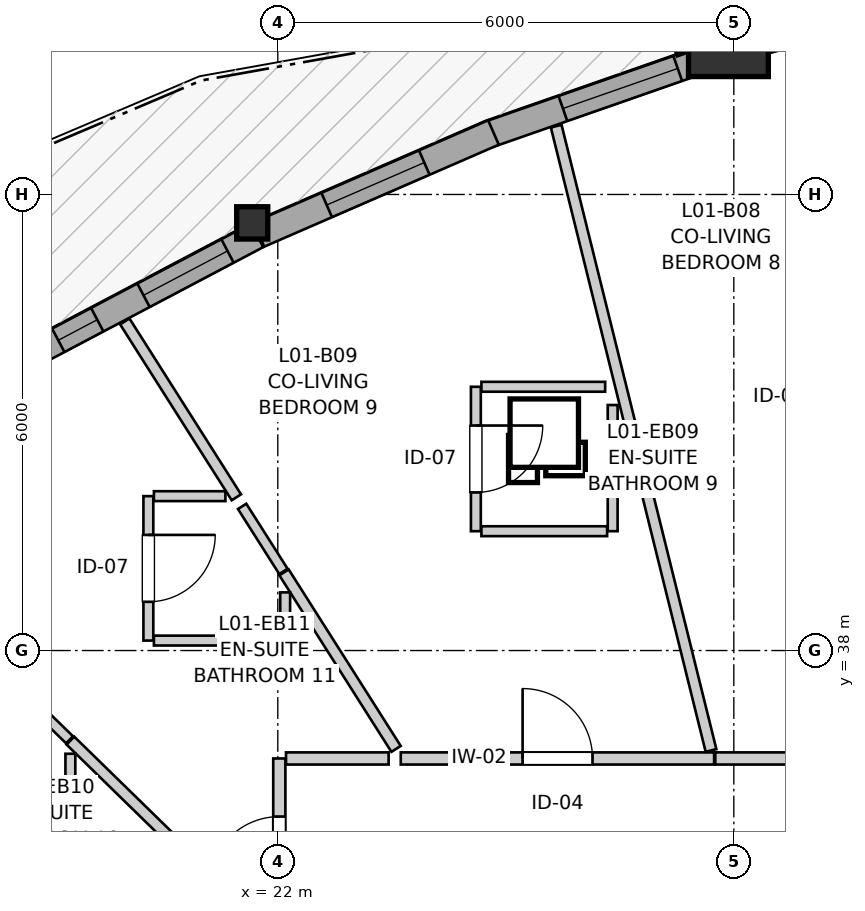
"""IFC4 building model, lengths in metres.
Left out: names, types, materials, properties, quantities, classifications, styles, units other than length and angle.
Written with IfcOpenShell. Run it as: python <this file> out.ifc"""

import sys

from ifc_helpers import new_model, si_unit, direction, frame, frame_2d, origin, origin_2d, place, context, subcontext, project, spatial, rectangle, i_section, extrude, source, transform, mapped, element, fill, save


model = new_model("IFC4")
c1 = context("Model", 3, precision=1e-05, world=origin(), true_north=direction((0.0, 1.0)))
c2 = subcontext(c1, "Body", "Model", "MODEL_VIEW")
j1 = project(units=[si_unit("LENGTHUNIT", "METRE"), si_unit("PLANEANGLEUNIT", "RADIAN")], contexts=[c1])
p1 = place(None, origin())
s1 = spatial("IfcSite", under=j1, at=p1, CompositionType="ELEMENT")
p2 = place(p1, origin())
s2 = spatial("IfcBuilding", under=s1, at=p2, CompositionType="ELEMENT")
p3 = place(p2, frame((0.0, 0.0, 7.8)))
s3 = spatial("IfcBuildingStorey", under=s2, at=p3, CompositionType="ELEMENT", Elevation=7.8)
m1 = source(origin(), c2, "Body", "SweptSolid", [
    extrude(rectangle(XDim=1.05, YDim=1.05, at=origin_2d()), origin(), (0.0, 0.0, 1.0), 2.94),
])
p4 = place(p3, frame((27.929, 46.076, 0.0), z_axis=(0.0, 0.0, 1.0), x_axis=(1.0, 0.0, 0.0)))
e1 = element("IfcColumn", 1, at=p4, inside=s3, PredefinedType="COLUMN", context=c2, shape_type="MappedRepresentation", body=[
    mapped(m1, transform((0.0, 0.0, 0.0), x_axis=(1.0, 0.0, 0.0), y_axis=(0.0, 1.0, 0.0), z_axis=(0.0, 0.0, 1.0), scale=1.0)),
])
m2 = source(origin(), c2, "Body", "SweptSolid", [
    extrude(i_section(OverallWidth=0.409, OverallDepth=0.425, WebThickness=0.03, FlangeThickness=0.048, FilletRadius=0.015, at=origin_2d()), origin(), (0.0, 0.0, 1.0), 2.94),
])
p5 = place(p3, frame((21.664, 43.626, 0.0), z_axis=(0.0, 0.0, 1.0), x_axis=(1.0, 0.0, 0.0)))
e2 = element("IfcColumn", 2, at=p5, inside=s3, PredefinedType="PILASTER", context=c2, shape_type="MappedRepresentation", body=[
    mapped(m2, transform((0.0, 0.0, 0.0), x_axis=(1.0, 0.0, 0.0), y_axis=(0.0, 1.0, 0.0), z_axis=(0.0, 0.0, 1.0), scale=1.0)),
])
p6 = place(p3, frame((31.333, 46.814, 0.0), z_axis=(0.0, 0.0, 1.0), x_axis=(-0.965456905924, -0.260562780926, 0.0)))
e3 = element("IfcWall", 3, at=p6, inside=s3, PredefinedType="SOLIDWALL", context=c2, shape_type="SweptSolid", body=[
    extrude(rectangle(XDim=3.179, YDim=0.35, at=frame_2d((1.59, 0.0))), origin(), (0.0, 0.0, 1.0), 2.42),
])
p7 = place(p6, frame((1.09, 0.0, 0.0)))
e4 = element("IfcOpeningElement", 4, at=p7, cuts=e3, PredefinedType="OPENING", context=c2, shape_type="SweptSolid", body=[
    extrude(rectangle(XDim=1.0, YDim=2.1, at=frame_2d((0.5, 1.05))), frame((0.0, 0.185, 0.0), z_axis=(0.0, -1.0, 0.0), x_axis=(1.0, 0.0, 0.0)), (0.0, 0.0, 1.0), 0.37),
])
p8 = place(p3, frame((27.703, 45.812, 0.0), z_axis=(0.0, 0.0, 1.0), x_axis=(-0.944149283204, -0.329518028377, 0.0)))
e5 = element("IfcWall", 5, at=p8, inside=s3, PredefinedType="SOLIDWALL", context=c2, shape_type="SweptSolid", body=[
    extrude(rectangle(XDim=3.123, YDim=0.35, at=frame_2d((1.562, 0.0))), origin(), (0.0, 0.0, 1.0), 2.42),
])
p9 = place(p8, frame((0.468, 0.0, 0.82)))
e6 = element("IfcOpeningElement", 6, at=p9, cuts=e5, PredefinedType="OPENING", context=c2, shape_type="SweptSolid", body=[
    extrude(rectangle(XDim=1.6, YDim=1.35, at=frame_2d((0.8, 0.675))), frame((0.0, 0.185, 0.0), z_axis=(0.0, -1.0, 0.0), x_axis=(1.0, 0.0, 0.0)), (0.0, 0.0, 1.0), 0.37),
])
p10 = place(p3, frame((24.838, 44.815, 0.0), z_axis=(0.0, 0.0, 1.0), x_axis=(-0.917087357706, -0.398686315712, 0.0)))
e7 = element("IfcWall", 7, at=p10, inside=s3, PredefinedType="SOLIDWALL", context=c2, shape_type="SweptSolid", body=[
    extrude(rectangle(XDim=3.365, YDim=0.35, at=frame_2d((1.683, 0.0))), origin(), (0.0, 0.0, 1.0), 2.42),
])
p11 = place(p10, frame((0.992, 0.0, 0.82)))
e8 = element("IfcOpeningElement", 8, at=p11, cuts=e7, PredefinedType="OPENING", context=c2, shape_type="SweptSolid", body=[
    extrude(rectangle(XDim=1.4, YDim=1.35, at=frame_2d((0.7, 0.675))), frame((0.0, 0.185, 0.0), z_axis=(0.0, -1.0, 0.0), x_axis=(1.0, 0.0, 0.0)), (0.0, 0.0, 1.0), 0.37),
])
p12 = place(p3, frame((21.728, 43.462, 0.0), z_axis=(0.0, 0.0, 1.0), x_axis=(-0.884404833282, -0.466720570435, 0.0)))
e9 = element("IfcWall", 9, at=p12, inside=s3, PredefinedType="SOLIDWALL", context=c2, shape_type="SweptSolid", body=[
    extrude(rectangle(XDim=3.346, YDim=0.35, at=frame_2d((1.673, 0.0))), origin(), (0.0, 0.0, 1.0), 2.42),
])
p13 = place(p12, frame((0.44, 0.0, 0.82)))
e10 = element("IfcOpeningElement", 10, at=p13, cuts=e9, PredefinedType="OPENING", context=c2, shape_type="SweptSolid", body=[
    extrude(rectangle(XDim=1.25, YDim=1.35, at=frame_2d((0.625, 0.675))), frame((0.0, 0.185, 0.0), z_axis=(0.0, -1.0, 0.0), x_axis=(1.0, 0.0, 0.0)), (0.0, 0.0, 1.0), 0.37),
])
p14 = place(p12, frame((2.378, 0.0, 0.82)))
e11 = element("IfcOpeningElement", 11, at=p14, cuts=e9, PredefinedType="OPENING", context=c2, shape_type="SweptSolid", body=[
    extrude(rectangle(XDim=0.58, YDim=1.35, at=frame_2d((0.29, 0.675))), frame((0.0, 0.185, 0.0), z_axis=(0.0, -1.0, 0.0), x_axis=(1.0, 0.0, 0.0)), (0.0, 0.0, 1.0), 0.37),
])
p15 = place(p3, frame((23.618, 36.58, 0.0), z_axis=(0.0, 0.0, 1.0), x_axis=(1.0, 0.0, 0.0)))
e12 = element("IfcWall", 12, at=p15, inside=s3, PredefinedType="PARTITIONING", context=c2, shape_type="SweptSolid", body=[
    extrude(rectangle(XDim=4.123, YDim=0.16, at=frame_2d((2.062, 0.0))), origin(), (0.0, 0.0, 1.0), 2.548),
])
p16 = place(p15, frame((1.603, 0.0, 0.0)))
e13 = element("IfcOpeningElement", 13, at=p16, cuts=e12, PredefinedType="OPENING", context=c2, shape_type="SweptSolid", body=[
    extrude(rectangle(XDim=0.92, YDim=2.1, at=frame_2d((0.46, 1.05))), frame((0.0, 0.09, 0.0), z_axis=(0.0, -1.0, 0.0), x_axis=(1.0, 0.0, 0.0)), (0.0, 0.0, 1.0), 0.18),
])
p17 = place(p3, frame((27.756, 36.58, 0.0), z_axis=(0.0, 0.0, 1.0), x_axis=(1.0, 0.0, 0.0)))
e14 = element("IfcWall", 14, at=p17, inside=s3, PredefinedType="PARTITIONING", context=c2, shape_type="SweptSolid", body=[
    extrude(rectangle(XDim=3.07, YDim=0.16, at=frame_2d((1.535, 0.0))), origin(), (0.0, 0.0, 1.0), 2.94),
])
p18 = place(p17, frame((1.788, 0.0, 0.0)))
e15 = element("IfcOpeningElement", 15, at=p18, cuts=e14, PredefinedType="OPENING", context=c2, shape_type="SweptSolid", body=[
    extrude(rectangle(XDim=0.92, YDim=2.1, at=frame_2d((0.46, 1.05))), frame((0.0, 0.09, 0.0), z_axis=(0.0, -1.0, 0.0), x_axis=(1.0, 0.0, 0.0)), (0.0, 0.0, 1.0), 0.18),
])
p19 = place(p3, frame((22.02, 34.167, 0.0), z_axis=(0.0, 0.0, 1.0), x_axis=(0.0, 1.0, 0.0)))
e16 = element("IfcWall", 16, at=p19, inside=s3, PredefinedType="PARTITIONING", context=c2, shape_type="SweptSolid", body=[
    extrude(rectangle(XDim=2.413, YDim=0.16, at=frame_2d((1.207, 0.0))), origin(), (0.0, 0.0, 1.0), 2.94),
])
p20 = place(p19, frame((0.729, 0.0, 0.0)))
e17 = element("IfcOpeningElement", 17, at=p20, cuts=e16, PredefinedType="OPENING", context=c2, shape_type="SweptSolid", body=[
    extrude(rectangle(XDim=0.92, YDim=2.1, at=frame_2d((0.46, 1.05))), frame((0.0, 0.09, 0.0), z_axis=(0.0, -1.0, 0.0), x_axis=(1.0, 0.0, 0.0)), (0.0, 0.0, 1.0), 0.18),
])
p21 = place(p3, frame((24.606, 41.47, 0.0), z_axis=(0.0, 0.0, 1.0), x_axis=(0.0, -1.0, 0.0)))
e18 = element("IfcWall", 18, at=p21, inside=s3, PredefinedType="PARTITIONING", context=c2, shape_type="SweptSolid", body=[
    extrude(rectangle(XDim=1.9, YDim=0.13, at=frame_2d((0.95, 0.0))), origin(), (0.0, 0.0, 1.0), 2.94),
])
p22 = place(p21, frame((0.51, 0.0, 0.0)))
e19 = element("IfcOpeningElement", 19, at=p22, cuts=e18, PredefinedType="OPENING", context=c2, shape_type="SweptSolid", body=[
    extrude(rectangle(XDim=0.88, YDim=2.05, at=frame_2d((0.44, 1.025))), frame((0.0, 0.075, 0.0), z_axis=(0.0, -1.0, 0.0), x_axis=(1.0, 0.0, 0.0)), (0.0, 0.0, 1.0), 0.15),
])
p23 = place(p3, frame((20.297, 40.031, 0.0), z_axis=(0.0, 0.0, 1.0), x_axis=(0.0, -1.0, 0.0)))
e20 = element("IfcWall", 20, at=p23, inside=s3, PredefinedType="PARTITIONING", context=c2, shape_type="SweptSolid", body=[
    extrude(rectangle(XDim=1.9, YDim=0.13, at=frame_2d((0.95, 0.0))), origin(), (0.0, 0.0, 1.0), 2.94),
])
p24 = place(p23, frame((0.51, 0.0, 0.0)))
e21 = element("IfcOpeningElement", 21, at=p24, cuts=e20, PredefinedType="OPENING", context=c2, shape_type="SweptSolid", body=[
    extrude(rectangle(XDim=0.88, YDim=2.05, at=frame_2d((0.44, 1.025))), frame((0.0, 0.075, 0.0), z_axis=(0.0, -1.0, 0.0), x_axis=(1.0, 0.0, 0.0)), (0.0, 0.0, 1.0), 0.15),
])
p25 = place(p3, frame((12.829, 37.479, 0.0), z_axis=(0.0, 0.0, 1.0), x_axis=(0.836435846472, -0.548064845376, 0.0)))
e22 = element("IfcWall", 22, at=p25, inside=s3, PredefinedType="PARTITIONING", context=c2, shape_type="SweptSolid", body=[
    extrude(rectangle(XDim=10.838, YDim=0.145, at=frame_2d((5.419, 0.0))), origin(), (0.0, 0.0, 1.0), 2.94),
])
p26 = place(p3, frame((25.663, 44.899, 0.0), z_axis=(0.0, 0.0, 1.0), x_axis=(0.240695577024, -0.970600658974, 0.0)))
e23 = element("IfcWall", 23, at=p26, inside=s3, PredefinedType="PARTITIONING", context=c2, shape_type="SweptSolid", body=[
    extrude(rectangle(XDim=8.462, YDim=0.145, at=frame_2d((4.231, 0.0))), origin(), (0.0, 0.0, 1.0), 2.94),
])
p27 = place(p3, frame((19.271, 36.815, 0.0), z_axis=(0.0, 0.0, 1.0), x_axis=(0.71551452036, -0.698597860828, 0.0)))
e24 = element("IfcWall", 24, at=p27, inside=s3, PredefinedType="PARTITIONING", context=c2, shape_type="SweptSolid", body=[
    extrude(rectangle(XDim=3.651, YDim=0.145, at=frame_2d((1.826, 0.0))), origin(), (0.0, 0.0, 1.0), 2.308),
])
p28 = place(p3, frame((22.082, 39.028, 0.0), z_axis=(0.0, 0.0, 1.0), x_axis=(0.535944885386, -0.844252971465, 0.0)))
e25 = element("IfcWall", 25, at=p28, inside=s3, PredefinedType="PARTITIONING", context=c2, shape_type="SweptSolid", body=[
    extrude(rectangle(XDim=2.751, YDim=0.145, at=frame_2d((1.375, 0.0))), origin(), (0.0, 0.0, 1.0), 2.94),
])
p29 = place(p3, frame((19.987, 42.33, 0.0), z_axis=(0.0, 0.0, 1.0), x_axis=(0.535808561115, -0.844339496788, 0.0)))
e26 = element("IfcWall", 26, at=p29, inside=s3, PredefinedType="PARTITIONING", context=c2, shape_type="SweptSolid", body=[
    extrude(rectangle(XDim=2.74, YDim=0.145, at=frame_2d((1.37, 0.0))), origin(), (0.0, 0.0, 1.0), 2.94),
])
p30 = place(p3, frame((26.406, 39.57, 0.0), z_axis=(0.0, 0.0, 1.0), x_axis=(0.0, 1.0, 0.0)))
e27 = element("IfcWall", 27, at=p30, inside=s3, PredefinedType="PARTITIONING", context=c2, shape_type="SweptSolid", body=[
    extrude(rectangle(XDim=1.66, YDim=0.13, at=frame_2d((0.83, 0.0))), origin(), (0.0, 0.0, 1.0), 2.94),
])
p31 = place(p3, frame((17.544, 36.125, 0.0), z_axis=(0.0, 0.0, 1.0), x_axis=(1.0, 0.0, 0.0)))
e28 = element("IfcWall", 28, at=p31, inside=s3, PredefinedType="PARTITIONING", context=c2, shape_type="SweptSolid", body=[
    extrude(rectangle(XDim=1.727, YDim=0.13, at=frame_2d((0.864, 0.0))), origin(), (0.0, 0.0, 1.0), 2.94),
])
p32 = place(p3, frame((20.37, 38.131, 0.0), z_axis=(0.0, 0.0, 1.0), x_axis=(1.0, 0.0, 0.0)))
e29 = element("IfcWall", 29, at=p32, inside=s3, PredefinedType="PARTITIONING", context=c2, shape_type="SweptSolid", body=[
    extrude(rectangle(XDim=1.727, YDim=0.13, at=frame_2d((0.863, 0.0))), origin(), (0.0, 0.0, 1.0), 2.94),
])
p33 = place(p3, frame((24.679, 41.47, 0.0), z_axis=(0.0, 0.0, 1.0), x_axis=(1.0, 0.0, 0.0)))
e30 = element("IfcWall", 30, at=p33, inside=s3, PredefinedType="PARTITIONING", context=c2, shape_type="SweptSolid", body=[
    extrude(rectangle(XDim=1.628, YDim=0.13, at=frame_2d((0.814, 0.0))), origin(), (0.0, 0.0, 1.0), 2.508),
])
p34 = place(p3, frame((24.679, 39.57, 0.0), z_axis=(0.0, 0.0, 1.0), x_axis=(1.0, 0.0, 0.0)))
e31 = element("IfcWall", 31, at=p34, inside=s3, PredefinedType="PARTITIONING", context=c2, shape_type="SweptSolid", body=[
    extrude(rectangle(XDim=1.654, YDim=0.13, at=frame_2d((0.827, 0.0))), origin(), (0.0, 0.0, 1.0), 2.94),
])
p35 = place(p3, frame((18.042, 38.014, 0.0), z_axis=(0.0, 0.0, 1.0), x_axis=(0.715729497461, -0.698377610225, 0.0)))
e32 = element("IfcWall", 32, at=p35, inside=s3, PredefinedType="PARTITIONING", context=c2, shape_type="SweptSolid", body=[
    extrude(rectangle(XDim=1.702, YDim=0.13, at=frame_2d((0.851, 0.0))), origin(), (0.0, 0.0, 1.0), 2.308),
])
p36 = place(p3, frame((22.108, 36.58, 0.0), z_axis=(0.0, 0.0, 1.0), x_axis=(1.0, 0.0, 0.0)))
e33 = element("IfcWall", 33, at=p36, inside=s3, PredefinedType="PARTITIONING", context=c2, shape_type="SweptSolid", body=[
    extrude(rectangle(XDim=1.35, YDim=0.16, at=frame_2d((0.675, 0.0))), origin(), (0.0, 0.0, 1.0), 2.94),
])
p37 = place(p3, frame((20.37, 40.031, 0.0), z_axis=(0.0, 0.0, 1.0), x_axis=(1.0, 0.0, 0.0)))
e34 = element("IfcWall", 34, at=p37, inside=s3, PredefinedType="PARTITIONING", context=c2, shape_type="SweptSolid", body=[
    extrude(rectangle(XDim=0.941, YDim=0.13, at=frame_2d((0.47, 0.0))), origin(), (0.0, 0.0, 1.0), 2.94),
])
p38 = place(p3, frame((21.531, 39.897, 0.0), z_axis=(0.0, 0.0, 1.0), x_axis=(0.536002688679, -0.844216274262, 0.0)))
e35 = element("IfcWall", 35, at=p38, inside=s3, PredefinedType="PARTITIONING", context=c2, shape_type="SweptSolid", body=[
    extrude(rectangle(XDim=1.014, YDim=0.13, at=frame_2d((0.507, 0.0))), origin(), (0.0, 0.0, 1.0), 2.94),
])
p39 = place(p3, frame((22.097, 38.204, 0.0), z_axis=(0.0, 0.0, 1.0), x_axis=(0.0, 1.0, 0.0)))
e36 = element("IfcWall", 36, at=p39, inside=s3, PredefinedType="PARTITIONING", context=c2, shape_type="SweptSolid", body=[
    extrude(rectangle(XDim=0.561, YDim=0.13, at=frame_2d((0.28, 0.0))), origin(), (0.0, 0.0, 1.0), 2.94),
])
p40 = place(p3, frame((19.271, 36.198, 0.0), z_axis=(0.0, 0.0, 1.0), x_axis=(0.0, 1.0, 0.0)))
e37 = element("IfcWall", 37, at=p40, inside=s3, PredefinedType="PARTITIONING", context=c2, shape_type="SweptSolid", body=[
    extrude(rectangle(XDim=0.444, YDim=0.13, at=frame_2d((0.222, 0.0))), origin(), (0.0, 0.0, 1.0), 2.94),
])
m3 = source(origin(), c2, "Body", "SweptSolid", [
    extrude(rectangle(XDim=1.6, YDim=1.35, at=frame_2d((0.8, 0.675))), frame((0.0, 0.03, 0.0), z_axis=(0.0, -1.0, 0.0), x_axis=(1.0, 0.0, 0.0)), (0.0, 0.0, 1.0), 0.06),
])
p41 = place(p9, origin())
e38 = element("IfcWindow", 38, at=p41, inside=s3, PartitioningType="SINGLE_PANEL", PredefinedType="WINDOW", context=c2, shape_type="MappedRepresentation", body=[
    mapped(m3, transform((0.0, 0.0, 0.0), x_axis=(1.0, 0.0, 0.0), y_axis=(0.0, 1.0, 0.0), z_axis=(0.0, 0.0, 1.0), scale=1.0)),
])
fill(e6, e38)
m4 = source(origin(), c2, "Body", "SweptSolid", [
    extrude(rectangle(XDim=1.4, YDim=1.35, at=frame_2d((0.7, 0.675))), frame((0.0, 0.03, 0.0), z_axis=(0.0, -1.0, 0.0), x_axis=(1.0, 0.0, 0.0)), (0.0, 0.0, 1.0), 0.06),
])
p42 = place(p11, origin())
e39 = element("IfcWindow", 39, at=p42, inside=s3, PartitioningType="SINGLE_PANEL", PredefinedType="WINDOW", context=c2, shape_type="MappedRepresentation", body=[
    mapped(m4, transform((0.0, 0.0, 0.0), x_axis=(1.0, 0.0, 0.0), y_axis=(0.0, 1.0, 0.0), z_axis=(0.0, 0.0, 1.0), scale=1.0)),
])
fill(e8, e39)
m5 = source(origin(), c2, "Body", "SweptSolid", [
    extrude(rectangle(XDim=1.25, YDim=1.35, at=frame_2d((0.625, 0.675))), frame((0.0, 0.03, 0.0), z_axis=(0.0, -1.0, 0.0), x_axis=(1.0, 0.0, 0.0)), (0.0, 0.0, 1.0), 0.06),
])
p43 = place(p13, origin())
e40 = element("IfcWindow", 40, at=p43, inside=s3, PartitioningType="SINGLE_PANEL", PredefinedType="WINDOW", context=c2, shape_type="MappedRepresentation", body=[
    mapped(m5, transform((0.0, 0.0, 0.0), x_axis=(1.0, 0.0, 0.0), y_axis=(0.0, 1.0, 0.0), z_axis=(0.0, 0.0, 1.0), scale=1.0)),
])
fill(e10, e40)
m6 = source(origin(), c2, "Body", "SweptSolid", [
    extrude(rectangle(XDim=0.58, YDim=1.35, at=frame_2d((0.29, 0.675))), frame((0.0, 0.03, 0.0), z_axis=(0.0, -1.0, 0.0), x_axis=(1.0, 0.0, 0.0)), (0.0, 0.0, 1.0), 0.06),
])
p44 = place(p14, origin())
e41 = element("IfcWindow", 41, at=p44, inside=s3, PartitioningType="SINGLE_PANEL", PredefinedType="WINDOW", context=c2, shape_type="MappedRepresentation", body=[
    mapped(m6, transform((0.0, 0.0, 0.0), x_axis=(1.0, 0.0, 0.0), y_axis=(0.0, 1.0, 0.0), z_axis=(0.0, 0.0, 1.0), scale=1.0)),
])
fill(e11, e41)
m7 = source(origin(), c2, "Body", "SweptSolid", [
    extrude(rectangle(XDim=0.92, YDim=2.1, at=frame_2d((0.46, 1.05))), frame((0.0, 0.025, 0.0), z_axis=(0.0, -1.0, 0.0), x_axis=(1.0, 0.0, 0.0)), (0.0, 0.0, 1.0), 0.05),
])
p45 = place(p16, origin())
e42 = element("IfcDoor", 42, at=p45, inside=s3, OperationType="SINGLE_SWING_LEFT", PredefinedType="DOOR", context=c2, shape_type="MappedRepresentation", body=[
    mapped(m7, transform((0.0, 0.0, 0.0), x_axis=(1.0, 0.0, 0.0), y_axis=(0.0, 1.0, 0.0), z_axis=(0.0, 0.0, 1.0), scale=1.0)),
])
fill(e13, e42)
p46 = place(p20, origin())
e43 = element("IfcDoor", 43, at=p46, inside=s3, OperationType="SINGLE_SWING_LEFT", PredefinedType="DOOR", context=c2, shape_type="MappedRepresentation", body=[
    mapped(m7, transform((0.0, 0.0, 0.0), x_axis=(1.0, 0.0, 0.0), y_axis=(0.0, 1.0, 0.0), z_axis=(0.0, 0.0, 1.0), scale=1.0)),
])
fill(e17, e43)
m8 = source(origin(), c2, "Body", "SweptSolid", [
    extrude(rectangle(XDim=0.88, YDim=2.05, at=frame_2d((0.44, 1.025))), frame((0.0, 0.025, 0.0), z_axis=(0.0, -1.0, 0.0), x_axis=(1.0, 0.0, 0.0)), (0.0, 0.0, 1.0), 0.05),
])
p47 = place(p22, origin())
e44 = element("IfcDoor", 44, at=p47, inside=s3, OperationType="SINGLE_SWING_LEFT", PredefinedType="DOOR", context=c2, shape_type="MappedRepresentation", body=[
    mapped(m8, transform((0.0, 0.0, 0.0), x_axis=(1.0, 0.0, 0.0), y_axis=(0.0, 1.0, 0.0), z_axis=(0.0, 0.0, 1.0), scale=1.0)),
])
fill(e19, e44)
p48 = place(p24, origin())
e45 = element("IfcDoor", 45, at=p48, inside=s3, OperationType="SINGLE_SWING_LEFT", PredefinedType="DOOR", context=c2, shape_type="MappedRepresentation", body=[
    mapped(m8, transform((0.0, 0.0, 0.0), x_axis=(1.0, 0.0, 0.0), y_axis=(0.0, 1.0, 0.0), z_axis=(0.0, 0.0, 1.0), scale=1.0)),
])
fill(e21, e45)
save(model, sys.argv[1])
